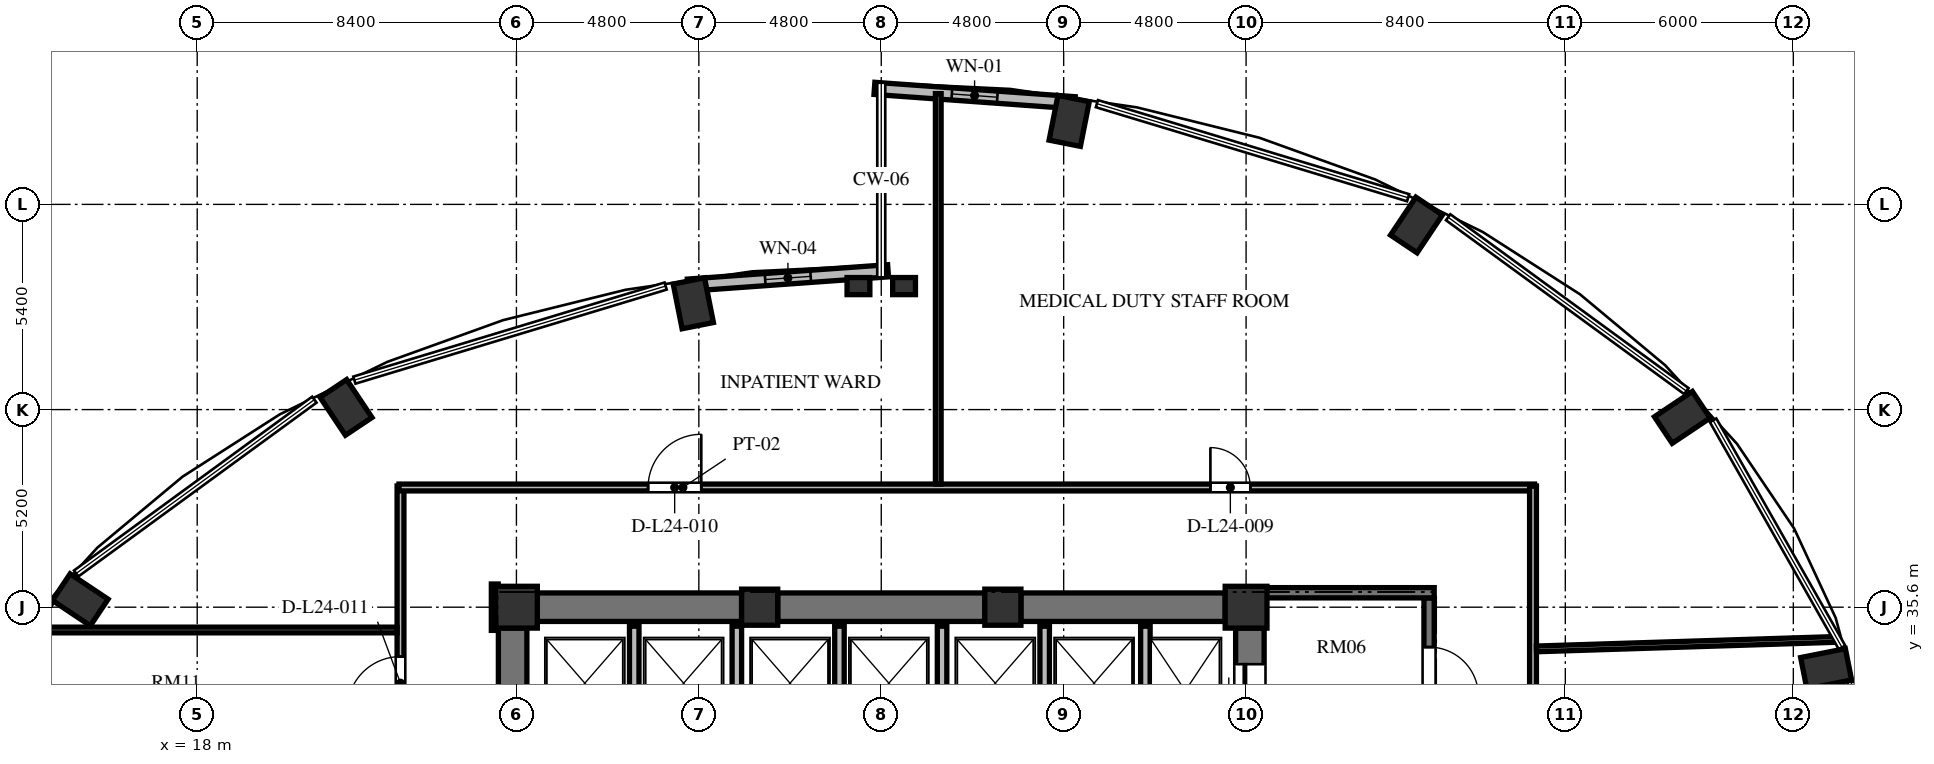
"""IFC4 building model, lengths in metres.
Left out: names, types, materials, properties, quantities, classifications, styles, units other than length and angle.
Written with IfcOpenShell. Run it as: python <this file> out.ifc"""

import sys

from ifc_helpers import new_model, si_unit, direction, frame, frame_2d, origin, origin_2d, place, context, subcontext, project, spatial, rectangle, extrude, element, fill, save


model = new_model("IFC4")
c1 = context("Model", 3, precision=1e-05, world=origin(), true_north=direction((0.0, 1.0)))
c2 = subcontext(c1, "Body", "Model", "MODEL_VIEW")
j1 = project(units=[si_unit("LENGTHUNIT", "METRE"), si_unit("PLANEANGLEUNIT", "RADIAN")], contexts=[c1])
p1 = place(None, origin())
s1 = spatial("IfcSite", under=j1, at=p1, CompositionType="ELEMENT")
p2 = place(p1, origin())
s2 = spatial("IfcBuilding", under=s1, at=p2, CompositionType="ELEMENT")
p3 = place(p2, frame((0.0, 0.0, 96.336)))
s3 = spatial("IfcBuildingStorey", under=s2, at=p3, CompositionType="ELEMENT", Elevation=96.336)
for number, where, z_axis, x_axis in (
    (1, (60.863, 33.98, 0.0), (0.0, 0.0, 1.0), (0.981, 0.195, 0.0)),
    (2, (57.078, 40.595, 0.0), (0.0, 0.0, 1.0), (0.831, 0.556, 0.0)),
    (3, (50.084, 45.657, 0.0), (0.0, 0.0, 1.0), (0.556, 0.831, 0.0)),
    (4, (40.946, 48.397, 0.0), (0.0, 0.0, 1.0), (0.195, 0.981, 0.0)),
    (5, (31.054, 43.597, 0.0), (0.0, 0.0, 1.0), (-0.195, 0.981, 0.0)),
    (6, (21.916, 40.857, 0.0), (0.0, 0.0, 1.0), (-0.556, 0.831, 0.0)),
    (7, (14.922, 35.795, 0.0), (0.0, 0.0, 1.0), (-0.831, 0.556, 0.0)),
):
    element("IfcColumn", number, at=place(p3, frame(where, z_axis=z_axis, x_axis=x_axis)), inside=s3, PredefinedType="COLUMN", context=c2, shape_type="SweptSolid", body=[
        extrude(rectangle(XDim=1.2, YDim=0.84, at=origin_2d()), origin(), (0.0, 0.0, 1.0), 3.648),
    ])
p4 = place(p3, frame((45.6, 35.6, 0.0), z_axis=(0.0, 0.0, 1.0), x_axis=(1.0, 0.0, 0.0)))
e8 = element("IfcColumn", 8, at=p4, inside=s3, PredefinedType="COLUMN", context=c2, shape_type="SweptSolid", body=[
    extrude(rectangle(XDim=1.1, YDim=1.1, at=origin_2d()), origin(), (0.0, 0.0, 1.0), 3.648),
])
for number, where, z_axis, x_axis in (
    (9, (39.2, 35.6, 0.0), (0.0, 0.0, 1.0), (1.0, 0.0, 0.0)),
    (10, (32.8, 35.6, 0.0), (0.0, 0.0, 1.0), (1.0, 0.0, 0.0)),
):
    element("IfcColumn", number, at=place(p3, frame(where, z_axis=z_axis, x_axis=x_axis)), inside=s3, PredefinedType="COLUMN", context=c2, shape_type="SweptSolid", body=[
        extrude(rectangle(XDim=0.95, YDim=0.95, at=origin_2d()), origin(), (0.0, 0.0, 1.0), 3.648),
    ])
p5 = place(p3, frame((26.4, 35.6, 0.0), z_axis=(0.0, 0.0, 1.0), x_axis=(1.0, 0.0, 0.0)))
e11 = element("IfcColumn", 11, at=p5, inside=s3, PredefinedType="COLUMN", context=c2, shape_type="SweptSolid", body=[
    extrude(rectangle(XDim=1.1, YDim=1.1, at=origin_2d()), origin(), (0.0, 0.0, 1.0), 3.648),
])
for number, where, z_axis, x_axis in (
    (12, (35.4, 44.05, 0.0), (0.0, 0.0, 1.0), (1.0, 0.0, 0.0)),
    (13, (36.6, 44.05, 0.0), (0.0, 0.0, 1.0), (1.0, 0.0, 0.0)),
):
    element("IfcColumn", number, at=place(p3, frame(where, z_axis=z_axis, x_axis=x_axis)), inside=s3, PredefinedType="PILASTER", context=c2, shape_type="SweptSolid", body=[
        extrude(rectangle(XDim=0.6, YDim=0.45, at=origin_2d()), origin(), (0.0, 0.0, 1.0), 3.648),
    ])
p6 = place(p3, frame((26.3, 20.95, 0.0), z_axis=(0.0, 0.0, 1.0), x_axis=(0.0, 1.0, 0.0)))
e14 = element("IfcWall", 14, at=p6, inside=s3, PredefinedType="SHEAR", context=c2, shape_type="SweptSolid", body=[
    extrude(rectangle(XDim=14.1, YDim=0.75, at=frame_2d((7.05, 0.0))), origin(), (0.0, 0.0, 1.0), 3.648),
])
p7 = place(p6, frame((6.5, 0.0, 0.0)))
e15 = element("IfcOpeningElement", 15, at=p7, cuts=e14, PredefinedType="OPENING", context=c2, shape_type="SweptSolid", body=[
    extrude(rectangle(XDim=1.2, YDim=2.15, at=frame_2d((0.6, 1.075))), frame((0.0, 0.385, 0.0), z_axis=(0.0, -1.0, 0.0), x_axis=(1.0, 0.0, 0.0)), (0.0, 0.0, 1.0), 0.77),
])
p8 = place(p6, frame((9.6, 0.0, 0.0)))
e16 = element("IfcOpeningElement", 16, at=p8, cuts=e14, PredefinedType="OPENING", context=c2, shape_type="SweptSolid", body=[
    extrude(rectangle(XDim=1.3, YDim=2.2, at=frame_2d((0.65, 1.1))), frame((0.0, 0.385, 0.0), z_axis=(0.0, -1.0, 0.0), x_axis=(1.0, 0.0, 0.0)), (0.0, 0.0, 1.0), 0.77),
])
p9 = place(p6, frame((3.26, 0.0, 0.0)))
e17 = element("IfcOpeningElement", 17, at=p9, cuts=e14, PredefinedType="OPENING", context=c2, shape_type="SweptSolid", body=[
    extrude(rectangle(XDim=1.3, YDim=2.2, at=frame_2d((0.65, 1.1))), frame((0.0, 0.385, 0.0), z_axis=(0.0, -1.0, 0.0), x_axis=(1.0, 0.0, 0.0)), (0.0, 0.0, 1.0), 0.77),
])
p10 = place(p3, frame((45.7, 20.95, 0.0), z_axis=(0.0, 0.0, 1.0), x_axis=(0.0, 1.0, 0.0)))
e18 = element("IfcWall", 18, at=p10, inside=s3, PredefinedType="SHEAR", context=c2, shape_type="SweptSolid", body=[
    extrude(rectangle(XDim=14.1, YDim=0.75, at=frame_2d((7.05, 0.0))), origin(), (0.0, 0.0, 1.0), 3.648),
])
p11 = place(p10, frame((11.75, 0.0, 0.0)))
e19 = element("IfcOpeningElement", 19, at=p11, cuts=e18, PredefinedType="OPENING", context=c2, shape_type="SweptSolid", body=[
    extrude(rectangle(XDim=1.4, YDim=2.3, at=frame_2d((0.7, 1.15))), frame((0.0, 0.385, 0.0), z_axis=(0.0, -1.0, 0.0), x_axis=(1.0, 0.0, 0.0)), (0.0, 0.0, 1.0), 0.77),
])
p12 = place(p10, frame((0.95, 0.0, 0.0)))
e20 = element("IfcOpeningElement", 20, at=p12, cuts=e18, PredefinedType="OPENING", context=c2, shape_type="SweptSolid", body=[
    extrude(rectangle(XDim=1.4, YDim=2.3, at=frame_2d((0.7, 1.15))), frame((0.0, 0.385, 0.0), z_axis=(0.0, -1.0, 0.0), x_axis=(1.0, 0.0, 0.0)), (0.0, 0.0, 1.0), 0.77),
])
p13 = place(p3, frame((26.95, 35.6, 0.0), z_axis=(0.0, 0.0, 1.0), x_axis=(1.0, 0.0, 0.0)))
e21 = element("IfcWall", 21, at=p13, inside=s3, PredefinedType="SHEAR", context=c2, shape_type="SweptSolid", body=[
    extrude(rectangle(XDim=5.375, YDim=0.75, at=frame_2d((2.688, 0.0))), origin(), (0.0, 0.0, 1.0), 3.648),
])
p14 = place(p3, frame((33.275, 35.6, 0.0), z_axis=(0.0, 0.0, 1.0), x_axis=(1.0, 0.0, 0.0)))
e22 = element("IfcWall", 22, at=p14, inside=s3, PredefinedType="SHEAR", context=c2, shape_type="SweptSolid", body=[
    extrude(rectangle(XDim=5.45, YDim=0.75, at=frame_2d((2.725, 0.0))), origin(), (0.0, 0.0, 1.0), 3.648),
])
p15 = place(p3, frame((39.675, 35.6, 0.0), z_axis=(0.0, 0.0, 1.0), x_axis=(1.0, 0.0, 0.0)))
e23 = element("IfcWall", 23, at=p15, inside=s3, PredefinedType="SHEAR", context=c2, shape_type="SweptSolid", body=[
    extrude(rectangle(XDim=5.375, YDim=0.75, at=frame_2d((2.688, 0.0))), origin(), (0.0, 0.0, 1.0), 3.648),
])
p16 = place(p3, frame((41.091, 48.875, 0.0), z_axis=(0.0, 0.0, 1.0), x_axis=(-0.997432364291, 0.071614793619, 0.0)))
e24 = element("IfcWall", 24, at=p16, inside=s3, PredefinedType="SOLIDWALL", context=c2, shape_type="SweptSolid", body=[
    extrude(rectangle(XDim=5.284, YDim=0.32, at=frame_2d((2.642, 0.0))), origin(), (0.0, 0.0, 1.0), 3.428),
])
p17 = place(p16, frame((2.042, 0.0, 0.85)))
e25 = element("IfcOpeningElement", 25, at=p17, cuts=e24, PredefinedType="OPENING", context=c2, shape_type="SweptSolid", body=[
    extrude(rectangle(XDim=1.2, YDim=2.2, at=frame_2d((0.6, 1.1))), frame((0.0, 0.17, 0.0), z_axis=(0.0, -1.0, 0.0), x_axis=(1.0, 0.0, 0.0)), (0.0, 0.0, 1.0), 0.34),
])
p18 = place(p3, frame((36.179, 44.453, 0.0), z_axis=(0.0, 0.0, 1.0), x_axis=(-0.997431890304, -0.071621394884, 0.0)))
e26 = element("IfcWall", 26, at=p18, inside=s3, PredefinedType="SOLIDWALL", context=c2, shape_type="SweptSolid", body=[
    extrude(rectangle(XDim=5.284, YDim=0.32, at=frame_2d((2.642, 0.0))), origin(), (0.0, 0.0, 1.0), 3.428),
])
p19 = place(p18, frame((2.042, 0.0, 0.85)))
e27 = element("IfcOpeningElement", 27, at=p19, cuts=e26, PredefinedType="OPENING", context=c2, shape_type="SweptSolid", body=[
    extrude(rectangle(XDim=1.2, YDim=1.8, at=frame_2d((0.6, 0.9))), frame((0.0, 0.17, 0.0), z_axis=(0.0, -1.0, 0.0), x_axis=(1.0, 0.0, 0.0)), (0.0, 0.0, 1.0), 0.34),
])
p20 = place(p3, frame((42.95, 31.92, 0.0), z_axis=(0.0, 0.0, 1.0), x_axis=(0.0, 1.0, 0.0)))
e28 = element("IfcWall", 28, at=p20, inside=s3, PredefinedType="SOLIDWALL", context=c2, shape_type="SweptSolid", body=[
    extrude(rectangle(XDim=3.18, YDim=0.25, at=frame_2d((1.59, 0.0))), origin(), (0.0, 0.0, 1.0), 3.428),
])
for number, where, z_axis, x_axis in (
    (29, (29.5, 32.42, 0.0), (0.0, 0.0, 1.0), (0.0, 1.0, 0.0)),
    (30, (32.2, 32.42, 0.0), (0.0, 0.0, 1.0), (0.0, 1.0, 0.0)),
    (31, (34.9, 32.42, 0.0), (0.0, 0.0, 1.0), (0.0, 1.0, 0.0)),
    (32, (37.6, 32.42, 0.0), (0.0, 0.0, 1.0), (0.0, 1.0, 0.0)),
    (33, (40.3, 32.42, 0.0), (0.0, 0.0, 1.0), (0.0, 1.0, 0.0)),
):
    element("IfcWall", number, at=place(p3, frame(where, z_axis=z_axis, x_axis=x_axis)), inside=s3, PredefinedType="SOLIDWALL", context=c2, shape_type="SweptSolid", body=[
        extrude(rectangle(XDim=2.68, YDim=0.25, at=frame_2d((1.34, 0.0))), origin(), (0.0, 0.0, 1.0), 3.428),
    ])
p21 = place(p3, frame((50.415, 35.845, 0.0), z_axis=(0.0, 0.0, 1.0), x_axis=(0.0, -1.0, 0.0)))
e34 = element("IfcWall", 34, at=p21, inside=s3, PredefinedType="SHEAR", context=c2, shape_type="SweptSolid", body=[
    extrude(rectangle(XDim=15.825, YDim=0.27, at=frame_2d((7.913, 0.0))), origin(), (0.0, 0.0, 1.0), 3.648),
])
p22 = place(p21, frame((4.445, 0.0, 0.0)))
e35 = element("IfcOpeningElement", 35, at=p22, cuts=e34, PredefinedType="OPENING", context=c2, shape_type="SweptSolid", body=[
    extrude(rectangle(XDim=1.2, YDim=2.15, at=frame_2d((0.6, 1.075))), frame((0.0, 0.145, 0.0), z_axis=(0.0, -1.0, 0.0), x_axis=(1.0, 0.0, 0.0)), (0.0, 0.0, 1.0), 0.29),
])
p23 = place(p21, frame((1.295, 0.0, 0.0)))
e36 = element("IfcOpeningElement", 36, at=p23, cuts=e34, PredefinedType="OPENING", context=c2, shape_type="SweptSolid", body=[
    extrude(rectangle(XDim=1.3, YDim=2.2, at=frame_2d((0.65, 1.1))), frame((0.0, 0.145, 0.0), z_axis=(0.0, -1.0, 0.0), x_axis=(1.0, 0.0, 0.0)), (0.0, 0.0, 1.0), 0.29),
])
p24 = place(p21, frame((13.095, 0.0, 0.0)))
e37 = element("IfcOpeningElement", 37, at=p24, cuts=e34, PredefinedType="OPENING", context=c2, shape_type="SweptSolid", body=[
    extrude(rectangle(XDim=1.3, YDim=2.2, at=frame_2d((0.65, 1.1))), frame((0.0, 0.145, 0.0), z_axis=(0.0, -1.0, 0.0), x_axis=(1.0, 0.0, 0.0)), (0.0, 0.0, 1.0), 0.29),
])
p25 = place(p3, frame((46.075, 35.98, 0.0), z_axis=(0.0, 0.0, 1.0), x_axis=(1.0, 0.0, 0.0)))
e38 = element("IfcWall", 38, at=p25, inside=s3, PredefinedType="SHEAR", context=c2, shape_type="SweptSolid", body=[
    extrude(rectangle(XDim=4.475, YDim=0.27, at=frame_2d((2.238, 0.0))), origin(), (0.0, 0.0, 1.0), 3.648),
])
p26 = place(p3, frame((23.35, 29.36, 0.0), z_axis=(0.0, 0.0, 1.0), x_axis=(0.0, 1.0, 0.0)))
e39 = element("IfcWall", 39, at=p26, inside=s3, PredefinedType="PARTITIONING", context=c2, shape_type="SweptSolid", body=[
    extrude(rectangle(XDim=9.43, YDim=0.18, at=frame_2d((4.715, 0.0))), origin(), (0.0, 0.0, 1.0), 3.428),
])
p27 = place(p26, frame((3.54, 0.0, 0.0)))
e40 = element("IfcOpeningElement", 40, at=p27, cuts=e39, PredefinedType="OPENING", context=c2, shape_type="SweptSolid", body=[
    extrude(rectangle(XDim=1.4, YDim=2.2, at=frame_2d((0.7, 1.1))), frame((0.0, 0.1, 0.0), z_axis=(0.0, -1.0, 0.0), x_axis=(1.0, 0.0, 0.0)), (0.0, 0.0, 1.0), 0.2),
])
p28 = place(p3, frame((23.31, 38.75, 0.0), z_axis=(0.0, 0.0, 1.0), x_axis=(1.0, 0.0, 0.0)))
e41 = element("IfcWall", 41, at=p28, inside=s3, PredefinedType="PARTITIONING", context=c2, shape_type="SweptSolid", body=[
    extrude(rectangle(XDim=29.88, YDim=0.18, at=frame_2d((14.94, 0.0))), origin(), (0.0, 0.0, 1.0), 3.053),
])
p29 = place(p28, frame((21.351, 0.0, 0.0)))
e42 = element("IfcOpeningElement", 42, at=p29, cuts=e41, PredefinedType="OPENING", context=c2, shape_type="SweptSolid", body=[
    extrude(rectangle(XDim=1.05, YDim=2.15, at=frame_2d((0.525, 1.075))), frame((0.0, 0.1, 0.0), z_axis=(0.0, -1.0, 0.0), x_axis=(1.0, 0.0, 0.0)), (0.0, 0.0, 1.0), 0.2),
])
p30 = place(p28, frame((6.554, 0.0, 0.0)))
e43 = element("IfcOpeningElement", 43, at=p30, cuts=e41, PredefinedType="OPENING", context=c2, shape_type="SweptSolid", body=[
    extrude(rectangle(XDim=1.4, YDim=2.2, at=frame_2d((0.7, 1.1))), frame((0.0, 0.1, 0.0), z_axis=(0.0, -1.0, 0.0), x_axis=(1.0, 0.0, 0.0)), (0.0, 0.0, 1.0), 0.2),
])
p31 = place(p3, frame((53.15, 38.79, 0.0), z_axis=(0.0, 0.0, 1.0), x_axis=(0.0, -1.0, 0.0)))
e44 = element("IfcWall", 44, at=p31, inside=s3, PredefinedType="PARTITIONING", context=c2, shape_type="SweptSolid", body=[
    extrude(rectangle(XDim=9.43, YDim=0.18, at=frame_2d((4.715, 0.0))), origin(), (0.0, 0.0, 1.0), 3.428),
])
p32 = place(p3, frame((25.83, 36.21, 0.0), z_axis=(0.0, 0.0, 1.0), x_axis=(0.0, -1.0, 0.0)))
e45 = element("IfcWall", 45, at=p32, inside=s3, PredefinedType="PARTITIONING", context=c2, shape_type="SweptSolid", body=[
    extrude(rectangle(XDim=1.22, YDim=0.18, at=frame_2d((0.61, 0.0))), origin(), (0.0, 0.0, 1.0), 3.428),
])
p33 = place(p3, frame((13.71, 35.0, 0.0), z_axis=(0.0, 0.0, 1.0), x_axis=(1.0, 0.0, 0.0)))
e46 = element("IfcWall", 46, at=p33, inside=s3, PredefinedType="PARTITIONING", context=c2, shape_type="SweptSolid", body=[
    extrude(rectangle(XDim=9.55, YDim=0.15, at=frame_2d((4.775, 0.0))), origin(), (0.0, 0.0, 1.0), 3.428),
])
p34 = place(p3, frame((53.24, 34.502, 0.0), z_axis=(0.0, 0.0, 1.0), x_axis=(0.999499445349, 0.031636351679, 0.0)))
e47 = element("IfcWall", 47, at=p34, inside=s3, PredefinedType="PARTITIONING", context=c2, shape_type="SweptSolid", body=[
    extrude(rectangle(XDim=7.933, YDim=0.15, at=frame_2d((3.967, 0.0))), origin(), (0.0, 0.0, 1.0), 2.813),
])
p35 = place(p3, frame((37.5, 38.84, 0.0), z_axis=(0.0, 0.0, 1.0), x_axis=(0.0, 1.0, 0.0)))
e48 = element("IfcWall", 48, at=p35, inside=s3, PredefinedType="PARTITIONING", context=c2, shape_type="SweptSolid", body=[
    extrude(rectangle(XDim=10.274, YDim=0.15, at=frame_2d((5.137, 0.0))), origin(), (0.0, 0.0, 1.0), 3.428),
])
p36 = place(p17, origin())
e49 = element("IfcWindow", 49, at=p36, inside=s3, PartitioningType="SINGLE_PANEL", PredefinedType="WINDOW", context=c2, shape_type="SweptSolid", body=[
    extrude(rectangle(XDim=1.2, YDim=2.2, at=frame_2d((0.6, 1.1))), frame((0.0, 0.03, 0.0), z_axis=(0.0, -1.0, 0.0), x_axis=(1.0, 0.0, 0.0)), (0.0, 0.0, 1.0), 0.06),
])
fill(e25, e49)
p37 = place(p19, origin())
e50 = element("IfcWindow", 50, at=p37, inside=s3, PartitioningType="SINGLE_PANEL", PredefinedType="WINDOW", context=c2, shape_type="SweptSolid", body=[
    extrude(rectangle(XDim=1.2, YDim=1.8, at=frame_2d((0.6, 0.9))), frame((0.0, 0.03, 0.0), z_axis=(0.0, -1.0, 0.0), x_axis=(1.0, 0.0, 0.0)), (0.0, 0.0, 1.0), 0.06),
])
fill(e27, e50)
p38 = place(p11, origin())
e51 = element("IfcDoor", 51, at=p38, inside=s3, OperationType="SLIDING_TO_LEFT", PredefinedType="DOOR", context=c2, shape_type="SweptSolid", body=[
    extrude(rectangle(XDim=1.4, YDim=2.3, at=frame_2d((0.7, 1.15))), frame((0.0, 0.025, 0.0), z_axis=(0.0, -1.0, 0.0), x_axis=(1.0, 0.0, 0.0)), (0.0, 0.0, 1.0), 0.05),
])
fill(e19, e51)
p39 = place(p23, origin())
e52 = element("IfcDoor", 52, at=p39, inside=s3, OperationType="SINGLE_SWING_RIGHT", PredefinedType="DOOR", context=c2, shape_type="SweptSolid", body=[
    extrude(rectangle(XDim=1.3, YDim=2.2, at=frame_2d((0.65, 1.1))), frame((0.0, 0.025, 0.0), z_axis=(0.0, -1.0, 0.0), x_axis=(1.0, 0.0, 0.0)), (0.0, 0.0, 1.0), 0.05),
])
fill(e36, e52)
p40 = place(p29, origin())
e53 = element("IfcDoor", 53, at=p40, inside=s3, OperationType="SINGLE_SWING_LEFT", PredefinedType="DOOR", context=c2, shape_type="SweptSolid", body=[
    extrude(rectangle(XDim=1.05, YDim=2.15, at=frame_2d((0.525, 1.075))), frame((0.0, 0.025, 0.0), z_axis=(0.0, -1.0, 0.0), x_axis=(1.0, 0.0, 0.0)), (0.0, 0.0, 1.0), 0.05),
])
fill(e42, e53)
p41 = place(p30, origin())
e54 = element("IfcDoor", 54, at=p41, inside=s3, OperationType="SINGLE_SWING_RIGHT", PredefinedType="DOOR", context=c2, shape_type="SweptSolid", body=[
    extrude(rectangle(XDim=1.4, YDim=2.2, at=frame_2d((0.7, 1.1))), frame((0.0, 0.025, 0.0), z_axis=(0.0, -1.0, 0.0), x_axis=(1.0, 0.0, 0.0)), (0.0, 0.0, 1.0), 0.05),
])
fill(e43, e54)
p42 = place(p27, origin())
e55 = element("IfcDoor", 55, at=p42, inside=s3, OperationType="SINGLE_SWING_LEFT", PredefinedType="DOOR", context=c2, shape_type="SweptSolid", body=[
    extrude(rectangle(XDim=1.4, YDim=2.2, at=frame_2d((0.7, 1.1))), frame((0.0, 0.025, 0.0), z_axis=(0.0, -1.0, 0.0), x_axis=(1.0, 0.0, 0.0)), (0.0, 0.0, 1.0), 0.05),
])
fill(e40, e55)
save(model, sys.argv[1])
